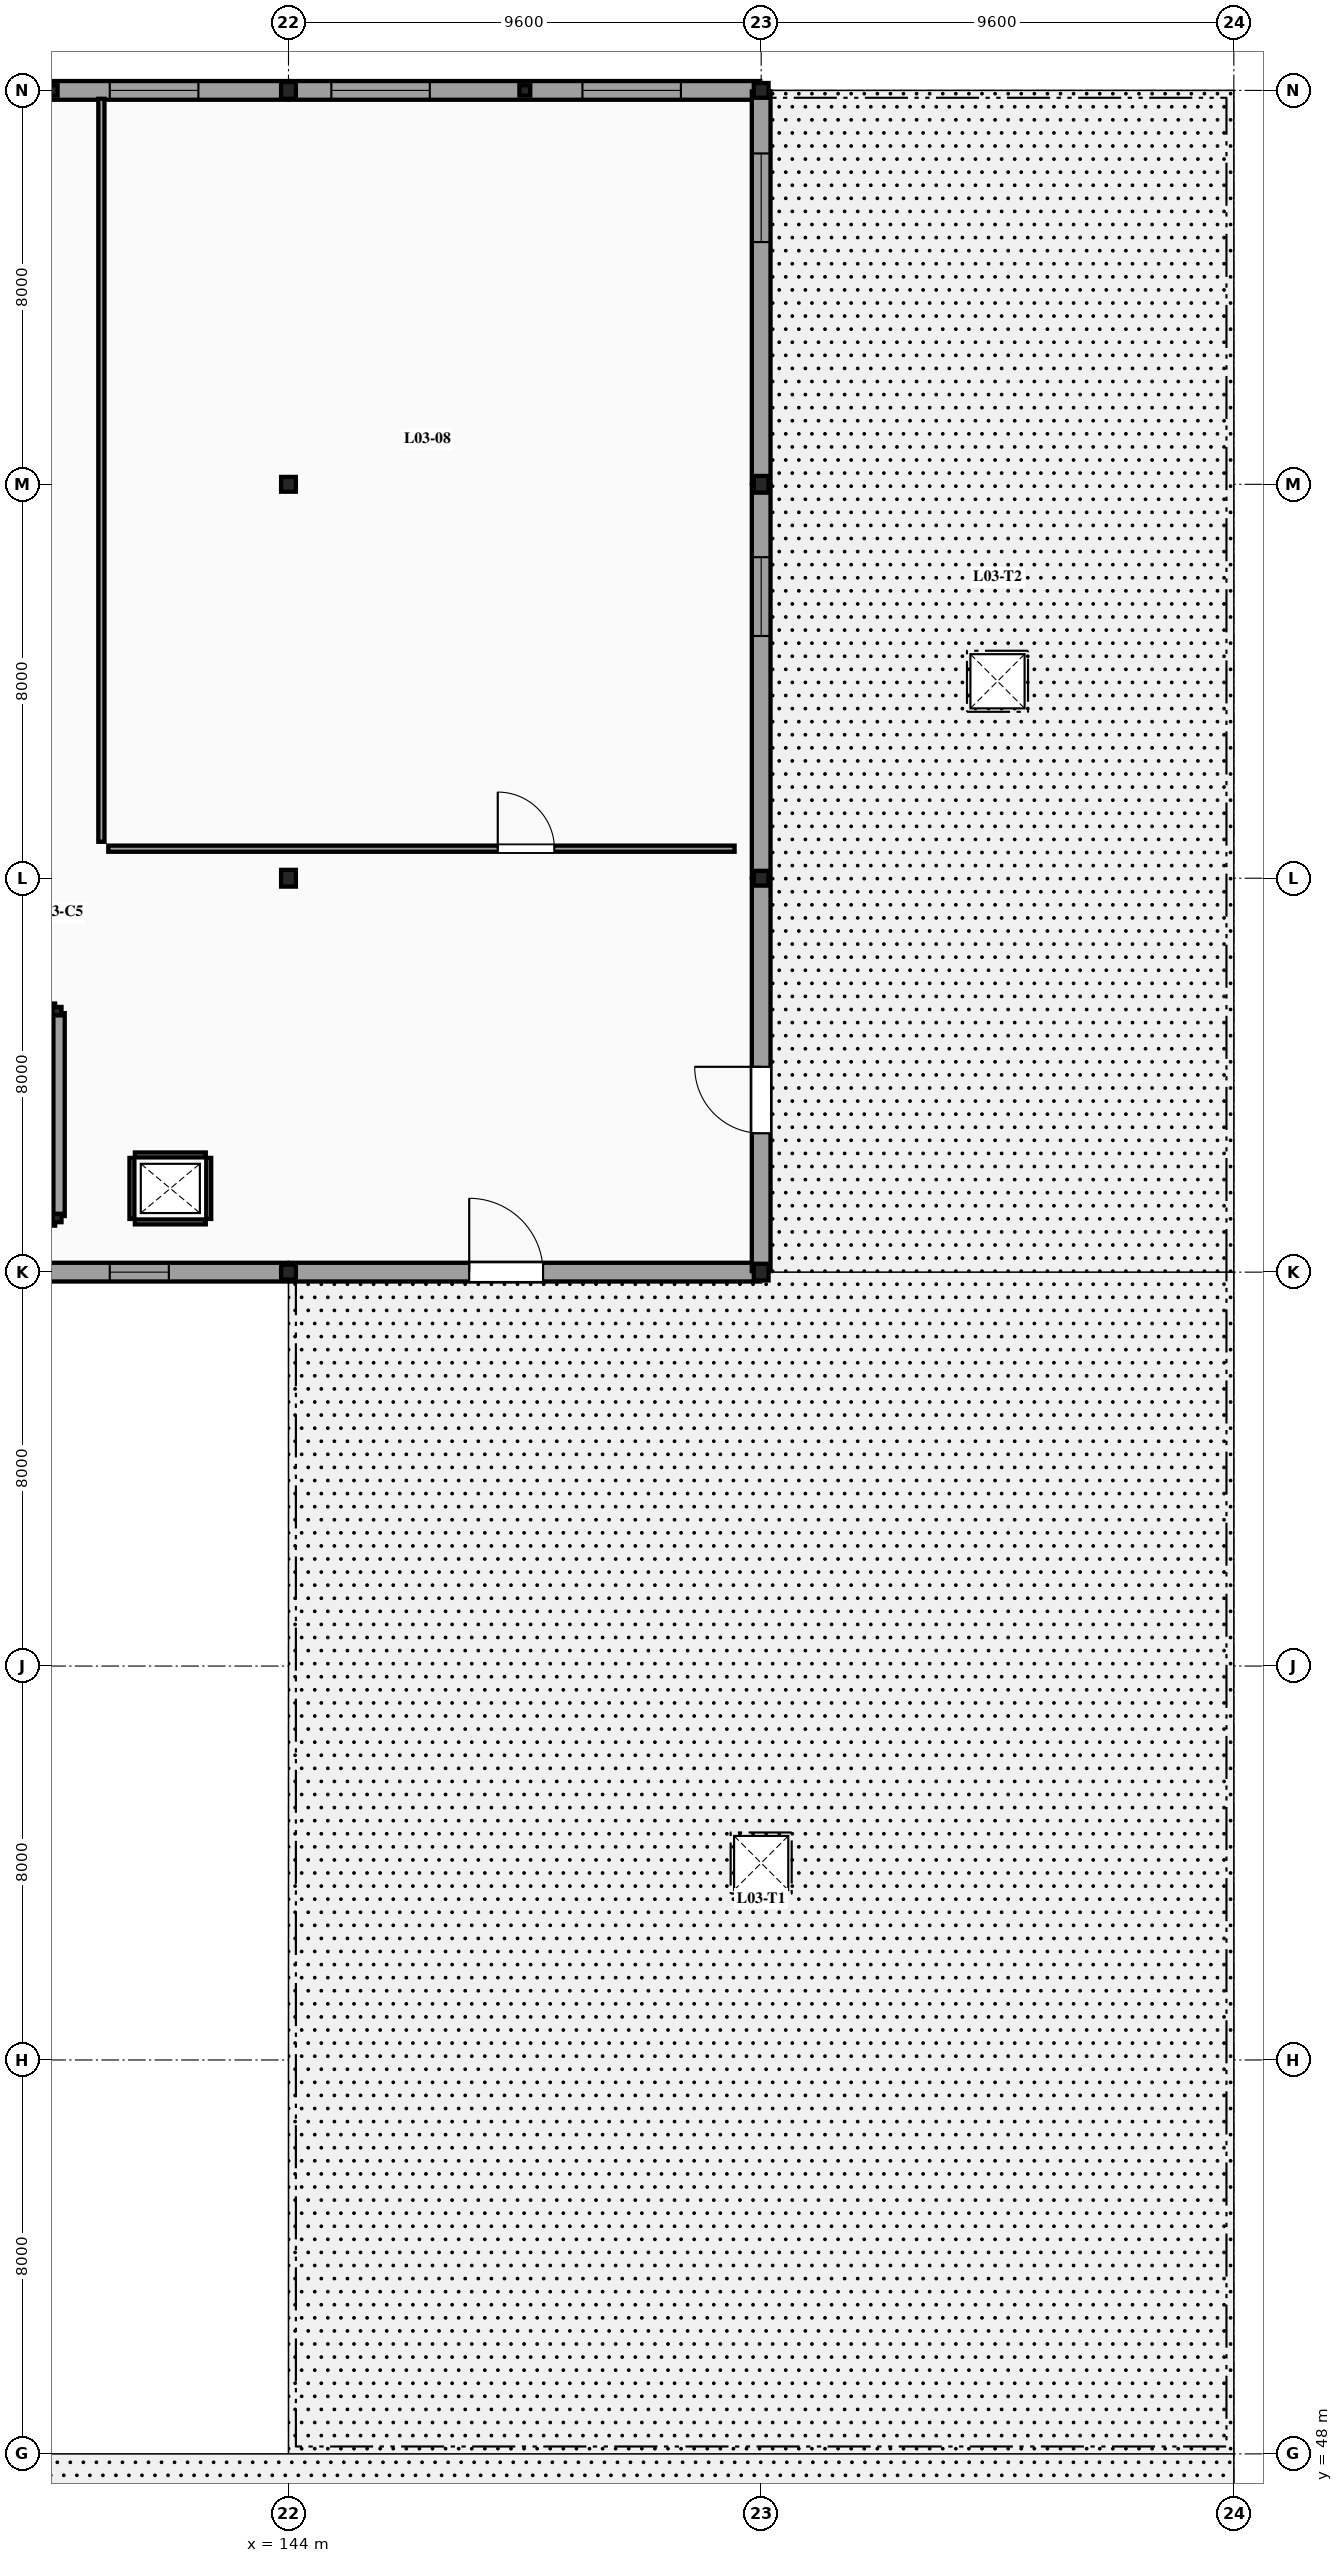
"""IFC4 building model, lengths in metres.
Left out: names, types, materials, properties, quantities, classifications, styles, units other than length and angle.
Written with IfcOpenShell. Run it as: python <this file> out.ifc"""

import sys

from ifc_helpers import new_model, si_unit, direction, frame, frame_2d, origin, origin_2d, place, context, subcontext, project, spatial, rectangle, i_section, extrude, element, fill, save


model = new_model("IFC4")
c1 = context("Model", 3, precision=1e-05, world=origin(), true_north=direction((0.0, 1.0)))
c2 = subcontext(c1, "Body", "Model", "MODEL_VIEW")
j1 = project(units=[si_unit("LENGTHUNIT", "METRE"), si_unit("PLANEANGLEUNIT", "RADIAN")], contexts=[c1])
p1 = place(None, origin())
s1 = spatial("IfcSite", under=j1, at=p1, CompositionType="ELEMENT")
p2 = place(p1, origin())
s2 = spatial("IfcBuilding", under=s1, at=p2, CompositionType="ELEMENT")
p3 = place(p2, frame((0.0, 0.0, 12.9)))
s3 = spatial("IfcBuildingStorey", under=s2, at=p3, CompositionType="ELEMENT", Elevation=12.9)
p4 = place(p3, frame((144.0, 72.0, -0.26), z_axis=(0.0, 0.0, 1.0), x_axis=(1.0, 0.0, 0.0)))
e1 = element("IfcColumn", 1, at=p4, inside=s3, PredefinedType="COLUMN", context=c2, shape_type="SweptSolid", body=[
    extrude(i_section(OverallWidth=0.3, OverallDepth=0.3, WebThickness=0.011, FlangeThickness=0.019, FilletRadius=0.027, at=origin_2d()), origin(), (0.0, 0.0, 1.0), 4.48),
])
p5 = place(p3, frame((144.0, 80.0, -0.26), z_axis=(0.0, 0.0, 1.0), x_axis=(1.0, 0.0, 0.0)))
e2 = element("IfcColumn", 2, at=p5, inside=s3, PredefinedType="COLUMN", context=c2, shape_type="SweptSolid", body=[
    extrude(i_section(OverallWidth=0.3, OverallDepth=0.34, WebThickness=0.012, FlangeThickness=0.021, FilletRadius=0.027, at=origin_2d()), origin(), (0.0, 0.0, 1.0), 4.48),
])
p6 = place(p3, frame((144.0, 88.0, -0.26), z_axis=(0.0, 0.0, 1.0), x_axis=(1.0, 0.0, 0.0)))
e3 = element("IfcColumn", 3, at=p6, inside=s3, PredefinedType="COLUMN", context=c2, shape_type="SweptSolid", body=[
    extrude(i_section(OverallWidth=0.3, OverallDepth=0.3, WebThickness=0.011, FlangeThickness=0.019, FilletRadius=0.027, at=origin_2d()), origin(), (0.0, 0.0, 1.0), 4.48),
])
for number, where, z_axis, x_axis in (
    (4, (144.0, 96.0, -0.26), (0.0, 0.0, 1.0), (1.0, 0.0, 0.0)),
    (5, (153.6, 72.0, -0.26), (0.0, 0.0, 1.0), (1.0, 0.0, 0.0)),
):
    element("IfcColumn", number, at=place(p3, frame(where, z_axis=z_axis, x_axis=x_axis)), inside=s3, PredefinedType="COLUMN", context=c2, shape_type="SweptSolid", body=[
        extrude(i_section(OverallWidth=0.3, OverallDepth=0.34, WebThickness=0.012, FlangeThickness=0.021, FilletRadius=0.027, at=origin_2d()), origin(), (0.0, 0.0, 1.0), 4.48),
    ])
p7 = place(p3, frame((153.6, 80.0, -0.26), z_axis=(0.0, 0.0, 1.0), x_axis=(1.0, 0.0, 0.0)))
e6 = element("IfcColumn", 6, at=p7, inside=s3, PredefinedType="COLUMN", context=c2, shape_type="SweptSolid", body=[
    extrude(i_section(OverallWidth=0.3, OverallDepth=0.3, WebThickness=0.011, FlangeThickness=0.019, FilletRadius=0.027, at=origin_2d()), origin(), (0.0, 0.0, 1.0), 4.48),
])
p8 = place(p3, frame((153.6, 88.0, -0.26), z_axis=(0.0, 0.0, 1.0), x_axis=(1.0, 0.0, 0.0)))
e7 = element("IfcColumn", 7, at=p8, inside=s3, PredefinedType="COLUMN", context=c2, shape_type="SweptSolid", body=[
    extrude(i_section(OverallWidth=0.3, OverallDepth=0.34, WebThickness=0.012, FlangeThickness=0.021, FilletRadius=0.027, at=origin_2d()), origin(), (0.0, 0.0, 1.0), 4.48),
])
p9 = place(p3, frame((153.6, 96.0, -0.26), z_axis=(0.0, 0.0, 1.0), x_axis=(1.0, 0.0, 0.0)))
e8 = element("IfcColumn", 8, at=p9, inside=s3, PredefinedType="COLUMN", context=c2, shape_type="SweptSolid", body=[
    extrude(i_section(OverallWidth=0.3, OverallDepth=0.3, WebThickness=0.011, FlangeThickness=0.019, FilletRadius=0.027, at=origin_2d()), origin(), (0.0, 0.0, 1.0), 4.48),
])
for number, where, z_axis, x_axis in (
    (9, (139.2, 96.0, -0.26), (0.0, 0.0, 1.0), (1.0, 0.0, 0.0)),
    (10, (148.8, 96.0, -0.26), (0.0, 0.0, 1.0), (1.0, 0.0, 0.0)),
):
    element("IfcColumn", number, at=place(p3, frame(where, z_axis=z_axis, x_axis=x_axis)), inside=s3, PredefinedType="PILASTER", context=c2, shape_type="SweptSolid", body=[
        extrude(i_section(OverallWidth=0.22, OverallDepth=0.21, WebThickness=0.007, FlangeThickness=0.011, FilletRadius=0.018, at=origin_2d()), origin(), (0.0, 0.0, 1.0), 4.48),
    ])
for number, where, z_axis, x_axis in (
    (11, (139.3, 73.1, 0.0), (0.0, 0.0, 1.0), (1.0, 0.0, 0.0)),
    (12, (139.3, 77.3, 0.0), (0.0, 0.0, 1.0), (1.0, 0.0, 0.0)),
):
    element("IfcColumn", number, at=place(p3, frame(where, z_axis=z_axis, x_axis=x_axis)), inside=s3, PredefinedType="COLUMN", context=c2, shape_type="SweptSolid", body=[
        extrude(i_section(OverallWidth=0.18, OverallDepth=0.171, WebThickness=0.006, FlangeThickness=0.01, FilletRadius=0.015, at=origin_2d()), origin(), (0.0, 0.0, 1.0), 4.5),
    ])
p10 = place(p3, frame((134.42, 72.0, 0.0), z_axis=(0.0, 0.0, 1.0), x_axis=(1.0, 0.0, 0.0)))
e13 = element("IfcWall", 13, at=p10, inside=s3, PredefinedType="SOLIDWALL", context=c2, shape_type="SweptSolid", body=[
    extrude(rectangle(XDim=9.56, YDim=0.38, at=frame_2d((4.78, 0.0))), origin(), (0.0, 0.0, 1.0), 3.54),
])
p11 = place(p10, frame((0.85, 0.0, 0.85)))
e14 = element("IfcOpeningElement", 14, at=p11, cuts=e13, PredefinedType="OPENING", context=c2, shape_type="SweptSolid", body=[
    extrude(rectangle(XDim=1.2, YDim=1.8, at=frame_2d((0.6, 0.9))), frame((0.0, 0.2, 0.0), z_axis=(0.0, -1.0, 0.0), x_axis=(1.0, 0.0, 0.0)), (0.0, 0.0, 1.0), 0.4),
])
p12 = place(p10, frame((5.95, 0.0, 0.85)))
e15 = element("IfcOpeningElement", 15, at=p12, cuts=e13, PredefinedType="OPENING", context=c2, shape_type="SweptSolid", body=[
    extrude(rectangle(XDim=1.2, YDim=1.8, at=frame_2d((0.6, 0.9))), frame((0.0, 0.2, 0.0), z_axis=(0.0, -1.0, 0.0), x_axis=(1.0, 0.0, 0.0)), (0.0, 0.0, 1.0), 0.4),
])
p13 = place(p3, frame((144.02, 72.0, 0.0), z_axis=(0.0, 0.0, 1.0), x_axis=(1.0, 0.0, 0.0)))
e16 = element("IfcWall", 16, at=p13, inside=s3, PredefinedType="SOLIDWALL", context=c2, shape_type="SweptSolid", body=[
    extrude(rectangle(XDim=9.56, YDim=0.38, at=frame_2d((4.78, 0.0))), origin(), (0.0, 0.0, 1.0), 3.54),
])
p14 = place(p13, frame((3.65, 0.0, 0.0)))
e17 = element("IfcOpeningElement", 17, at=p14, cuts=e16, PredefinedType="OPENING", context=c2, shape_type="SweptSolid", body=[
    extrude(rectangle(XDim=1.5, YDim=2.2, at=frame_2d((0.75, 1.1))), frame((0.0, 0.2, 0.0), z_axis=(0.0, -1.0, 0.0), x_axis=(1.0, 0.0, 0.0)), (0.0, 0.0, 1.0), 0.4),
])
p15 = place(p3, frame((134.42, 96.0, 0.0), z_axis=(0.0, 0.0, 1.0), x_axis=(1.0, 0.0, 0.0)))
e18 = element("IfcWall", 18, at=p15, inside=s3, PredefinedType="SOLIDWALL", context=c2, shape_type="SweptSolid", body=[
    extrude(rectangle(XDim=9.56, YDim=0.38, at=frame_2d((4.78, 0.0))), origin(), (0.0, 0.0, 1.0), 3.54),
])
p16 = place(p15, frame((0.85, 0.0, 0.72)))
e19 = element("IfcOpeningElement", 19, at=p16, cuts=e18, PredefinedType="OPENING", context=c2, shape_type="SweptSolid", body=[
    extrude(rectangle(XDim=1.8, YDim=1.6, at=frame_2d((0.9, 0.8))), frame((0.0, 0.2, 0.0), z_axis=(0.0, -1.0, 0.0), x_axis=(1.0, 0.0, 0.0)), (0.0, 0.0, 1.0), 0.4),
])
p17 = place(p15, frame((5.95, 0.0, 0.72)))
e20 = element("IfcOpeningElement", 20, at=p17, cuts=e18, PredefinedType="OPENING", context=c2, shape_type="SweptSolid", body=[
    extrude(rectangle(XDim=1.8, YDim=1.6, at=frame_2d((0.9, 0.8))), frame((0.0, 0.2, 0.0), z_axis=(0.0, -1.0, 0.0), x_axis=(1.0, 0.0, 0.0)), (0.0, 0.0, 1.0), 0.4),
])
p18 = place(p3, frame((144.02, 96.0, 0.0), z_axis=(0.0, 0.0, 1.0), x_axis=(1.0, 0.0, 0.0)))
e21 = element("IfcWall", 21, at=p18, inside=s3, PredefinedType="SOLIDWALL", context=c2, shape_type="SweptSolid", body=[
    extrude(rectangle(XDim=9.56, YDim=0.38, at=frame_2d((4.78, 0.0))), origin(), (0.0, 0.0, 1.0), 3.54),
])
p19 = place(p18, frame((0.85, 0.0, 0.85)))
e22 = element("IfcOpeningElement", 22, at=p19, cuts=e21, PredefinedType="OPENING", context=c2, shape_type="SweptSolid", body=[
    extrude(rectangle(XDim=2.0, YDim=2.2, at=frame_2d((1.0, 1.1))), frame((0.0, 0.2, 0.0), z_axis=(0.0, -1.0, 0.0), x_axis=(1.0, 0.0, 0.0)), (0.0, 0.0, 1.0), 0.4),
])
p20 = place(p18, frame((5.95, 0.0, 0.85)))
e23 = element("IfcOpeningElement", 23, at=p20, cuts=e21, PredefinedType="OPENING", context=c2, shape_type="SweptSolid", body=[
    extrude(rectangle(XDim=2.0, YDim=2.2, at=frame_2d((1.0, 1.1))), frame((0.0, 0.2, 0.0), z_axis=(0.0, -1.0, 0.0), x_axis=(1.0, 0.0, 0.0)), (0.0, 0.0, 1.0), 0.4),
])
p21 = place(p3, frame((153.6, 72.02, 0.0), z_axis=(0.0, 0.0, 1.0), x_axis=(0.0, 1.0, 0.0)))
e24 = element("IfcWall", 24, at=p21, inside=s3, PredefinedType="SOLIDWALL", context=c2, shape_type="SweptSolid", body=[
    extrude(rectangle(XDim=7.96, YDim=0.38, at=frame_2d((3.98, 0.0))), origin(), (0.0, 0.0, 1.0), 3.54),
])
p22 = place(p21, frame((2.8, 0.0, 0.0)))
e25 = element("IfcOpeningElement", 25, at=p22, cuts=e24, PredefinedType="OPENING", context=c2, shape_type="SweptSolid", body=[
    extrude(rectangle(XDim=1.35, YDim=2.2, at=frame_2d((0.675, 1.1))), frame((0.0, 0.2, 0.0), z_axis=(0.0, -1.0, 0.0), x_axis=(1.0, 0.0, 0.0)), (0.0, 0.0, 1.0), 0.4),
])
p23 = place(p3, frame((153.6, 80.02, 0.0), z_axis=(0.0, 0.0, 1.0), x_axis=(0.0, 1.0, 0.0)))
e26 = element("IfcWall", 26, at=p23, inside=s3, PredefinedType="SOLIDWALL", context=c2, shape_type="SweptSolid", body=[
    extrude(rectangle(XDim=7.96, YDim=0.38, at=frame_2d((3.98, 0.0))), origin(), (0.0, 0.0, 1.0), 3.54),
])
p24 = place(p23, frame((4.9, 0.0, 0.9)))
e27 = element("IfcOpeningElement", 27, at=p24, cuts=e26, PredefinedType="OPENING", context=c2, shape_type="SweptSolid", body=[
    extrude(rectangle(XDim=1.6, YDim=2.0, at=frame_2d((0.8, 1.0))), frame((0.0, 0.2, 0.0), z_axis=(0.0, -1.0, 0.0), x_axis=(1.0, 0.0, 0.0)), (0.0, 0.0, 1.0), 0.4),
])
p25 = place(p3, frame((153.6, 88.02, 0.0), z_axis=(0.0, 0.0, 1.0), x_axis=(0.0, 1.0, 0.0)))
e28 = element("IfcWall", 28, at=p25, inside=s3, PredefinedType="SOLIDWALL", context=c2, shape_type="SweptSolid", body=[
    extrude(rectangle(XDim=7.96, YDim=0.38, at=frame_2d((3.98, 0.0))), origin(), (0.0, 0.0, 1.0), 3.54),
])
p26 = place(p25, frame((4.9, 0.0, 0.9)))
e29 = element("IfcOpeningElement", 29, at=p26, cuts=e28, PredefinedType="OPENING", context=c2, shape_type="SweptSolid", body=[
    extrude(rectangle(XDim=1.8, YDim=2.4, at=frame_2d((0.9, 1.2))), frame((0.0, 0.2, 0.0), z_axis=(0.0, -1.0, 0.0), x_axis=(1.0, 0.0, 0.0)), (0.0, 0.0, 1.0), 0.4),
])
p27 = place(p3, frame((135.94, 73.06, 0.0), z_axis=(0.0, 0.0, 1.0), x_axis=(1.0, 0.0, 0.0)))
e30 = element("IfcWall", 30, at=p27, inside=s3, PredefinedType="SOLIDWALL", context=c2, shape_type="SweptSolid", body=[
    extrude(rectangle(XDim=3.32, YDim=0.23, at=frame_2d((1.66, 0.0))), origin(), (0.0, 0.0, 1.0), 3.38),
])
p28 = place(p3, frame((135.94, 77.34, 0.0), z_axis=(0.0, 0.0, 1.0), x_axis=(1.0, 0.0, 0.0)))
e31 = element("IfcWall", 31, at=p28, inside=s3, PredefinedType="SOLIDWALL", context=c2, shape_type="SweptSolid", body=[
    extrude(rectangle(XDim=3.32, YDim=0.23, at=frame_2d((1.66, 0.0))), origin(), (0.0, 0.0, 1.0), 3.38),
])
p29 = place(p28, frame((0.66, 0.0, 0.0)))
e32 = element("IfcOpeningElement", 32, at=p29, cuts=e31, PredefinedType="OPENING", context=c2, shape_type="SweptSolid", body=[
    extrude(rectangle(XDim=2.0, YDim=2.5, at=frame_2d((1.0, 1.25))), frame((0.0, 0.125, 0.0), z_axis=(0.0, -1.0, 0.0), x_axis=(1.0, 0.0, 0.0)), (0.0, 0.0, 1.0), 0.25),
])
p30 = place(p3, frame((139.34, 73.14, 0.0), z_axis=(0.0, 0.0, 1.0), x_axis=(0.0, 1.0, 0.0)))
e33 = element("IfcWall", 33, at=p30, inside=s3, PredefinedType="SOLIDWALL", context=c2, shape_type="SweptSolid", body=[
    extrude(rectangle(XDim=4.12, YDim=0.23, at=frame_2d((2.06, 0.0))), origin(), (0.0, 0.0, 1.0), 3.38),
])
p31 = place(p3, frame((140.34, 80.6, 0.0), z_axis=(0.0, 0.0, 1.0), x_axis=(1.0, 0.0, 0.0)))
e34 = element("IfcWall", 34, at=p31, inside=s3, PredefinedType="PARTITIONING", context=c2, shape_type="SweptSolid", body=[
    extrude(rectangle(XDim=12.72, YDim=0.125, at=frame_2d((6.36, 0.0))), origin(), (0.0, 0.0, 1.0), 3.38),
])
p32 = place(p31, frame((7.91, 0.0, 0.0)))
e35 = element("IfcOpeningElement", 35, at=p32, cuts=e34, PredefinedType="OPENING", context=c2, shape_type="SweptSolid", body=[
    extrude(rectangle(XDim=1.15, YDim=2.2, at=frame_2d((0.575, 1.1))), frame((0.0, 0.073, 0.0), z_axis=(0.0, -1.0, 0.0), x_axis=(1.0, 0.0, 0.0)), (0.0, 0.0, 1.0), 0.145),
])
p33 = place(p3, frame((140.2, 80.74, 0.0), z_axis=(0.0, 0.0, 1.0), x_axis=(0.0, 1.0, 0.0)))
e36 = element("IfcWall", 36, at=p33, inside=s3, PredefinedType="PARTITIONING", context=c2, shape_type="SweptSolid", body=[
    extrude(rectangle(XDim=15.09, YDim=0.125, at=frame_2d((7.545, 0.0))), origin(), (0.0, 0.0, 1.0), 3.38),
])
for number, where, z_axis, x_axis in (
    (37, (140.88, 74.38, 0.0), (0.0, 0.0, 1.0), (1.0, 0.0, 0.0)),
    (38, (140.88, 73.02, 0.0), (0.0, 0.0, 1.0), (1.0, 0.0, 0.0)),
):
    element("IfcWall", number, at=place(p3, frame(where, z_axis=z_axis, x_axis=x_axis)), inside=s3, PredefinedType="PARTITIONING", context=c2, shape_type="SweptSolid", body=[
        extrude(rectangle(XDim=1.44, YDim=0.1, at=frame_2d((0.72, 0.0))), origin(), (0.0, 0.0, 1.0), 3.38),
    ])
for number, where, z_axis, x_axis in (
    (39, (140.82, 73.08, 0.0), (0.0, 0.0, 1.0), (0.0, 1.0, 0.0)),
    (40, (142.38, 73.08, 0.0), (0.0, 0.0, 1.0), (0.0, 1.0, 0.0)),
):
    element("IfcWall", number, at=place(p3, frame(where, z_axis=z_axis, x_axis=x_axis)), inside=s3, PredefinedType="PARTITIONING", context=c2, shape_type="SweptSolid", body=[
        extrude(rectangle(XDim=1.24, YDim=0.1, at=frame_2d((0.62, 0.0))), origin(), (0.0, 0.0, 1.0), 3.38),
    ])
p34 = place(p12, origin())
e41 = element("IfcWindow", 41, at=p34, inside=s3, PartitioningType="SINGLE_PANEL", PredefinedType="WINDOW", context=c2, shape_type="SweptSolid", body=[
    extrude(rectangle(XDim=1.2, YDim=1.8, at=frame_2d((0.6, 0.9))), frame((0.0, 0.03, 0.0), z_axis=(0.0, -1.0, 0.0), x_axis=(1.0, 0.0, 0.0)), (0.0, 0.0, 1.0), 0.06),
])
fill(e15, e41)
p35 = place(p14, origin())
e42 = element("IfcDoor", 42, at=p35, inside=s3, OperationType="SINGLE_SWING_LEFT", PredefinedType="DOOR", context=c2, shape_type="SweptSolid", body=[
    extrude(rectangle(XDim=1.5, YDim=2.2, at=frame_2d((0.75, 1.1))), frame((0.0, 0.025, 0.0), z_axis=(0.0, -1.0, 0.0), x_axis=(1.0, 0.0, 0.0)), (0.0, 0.0, 1.0), 0.05),
])
fill(e17, e42)
p36 = place(p17, origin())
e43 = element("IfcWindow", 43, at=p36, inside=s3, PartitioningType="SINGLE_PANEL", PredefinedType="WINDOW", context=c2, shape_type="SweptSolid", body=[
    extrude(rectangle(XDim=1.8, YDim=1.6, at=frame_2d((0.9, 0.8))), frame((0.0, 0.03, 0.0), z_axis=(0.0, -1.0, 0.0), x_axis=(1.0, 0.0, 0.0)), (0.0, 0.0, 1.0), 0.06),
])
fill(e20, e43)
p37 = place(p19, origin())
e44 = element("IfcWindow", 44, at=p37, inside=s3, PartitioningType="SINGLE_PANEL", PredefinedType="WINDOW", context=c2, shape_type="SweptSolid", body=[
    extrude(rectangle(XDim=2.0, YDim=2.2, at=frame_2d((1.0, 1.1))), frame((0.0, 0.03, 0.0), z_axis=(0.0, -1.0, 0.0), x_axis=(1.0, 0.0, 0.0)), (0.0, 0.0, 1.0), 0.06),
])
fill(e22, e44)
p38 = place(p20, origin())
e45 = element("IfcWindow", 45, at=p38, inside=s3, PartitioningType="SINGLE_PANEL", PredefinedType="WINDOW", context=c2, shape_type="SweptSolid", body=[
    extrude(rectangle(XDim=2.0, YDim=2.2, at=frame_2d((1.0, 1.1))), frame((0.0, 0.03, 0.0), z_axis=(0.0, -1.0, 0.0), x_axis=(1.0, 0.0, 0.0)), (0.0, 0.0, 1.0), 0.06),
])
fill(e23, e45)
p39 = place(p22, origin())
e46 = element("IfcDoor", 46, at=p39, inside=s3, OperationType="SINGLE_SWING_RIGHT", PredefinedType="DOOR", context=c2, shape_type="SweptSolid", body=[
    extrude(rectangle(XDim=1.35, YDim=2.2, at=frame_2d((0.675, 1.1))), frame((0.0, 0.025, 0.0), z_axis=(0.0, -1.0, 0.0), x_axis=(1.0, 0.0, 0.0)), (0.0, 0.0, 1.0), 0.05),
])
fill(e25, e46)
p40 = place(p24, origin())
e47 = element("IfcWindow", 47, at=p40, inside=s3, PartitioningType="SINGLE_PANEL", PredefinedType="WINDOW", context=c2, shape_type="SweptSolid", body=[
    extrude(rectangle(XDim=1.6, YDim=2.0, at=frame_2d((0.8, 1.0))), frame((0.0, 0.03, 0.0), z_axis=(0.0, -1.0, 0.0), x_axis=(1.0, 0.0, 0.0)), (0.0, 0.0, 1.0), 0.06),
])
fill(e27, e47)
p41 = place(p26, origin())
e48 = element("IfcWindow", 48, at=p41, inside=s3, PartitioningType="SINGLE_PANEL", PredefinedType="WINDOW", context=c2, shape_type="SweptSolid", body=[
    extrude(rectangle(XDim=1.8, YDim=2.4, at=frame_2d((0.9, 1.2))), frame((0.0, 0.03, 0.0), z_axis=(0.0, -1.0, 0.0), x_axis=(1.0, 0.0, 0.0)), (0.0, 0.0, 1.0), 0.06),
])
fill(e29, e48)
p42 = place(p32, origin())
e49 = element("IfcDoor", 49, at=p42, inside=s3, OperationType="SINGLE_SWING_LEFT", PredefinedType="DOOR", context=c2, shape_type="SweptSolid", body=[
    extrude(rectangle(XDim=1.15, YDim=2.2, at=frame_2d((0.575, 1.1))), frame((0.0, 0.025, 0.0), z_axis=(0.0, -1.0, 0.0), x_axis=(1.0, 0.0, 0.0)), (0.0, 0.0, 1.0), 0.05),
])
fill(e35, e49)
save(model, sys.argv[1])
